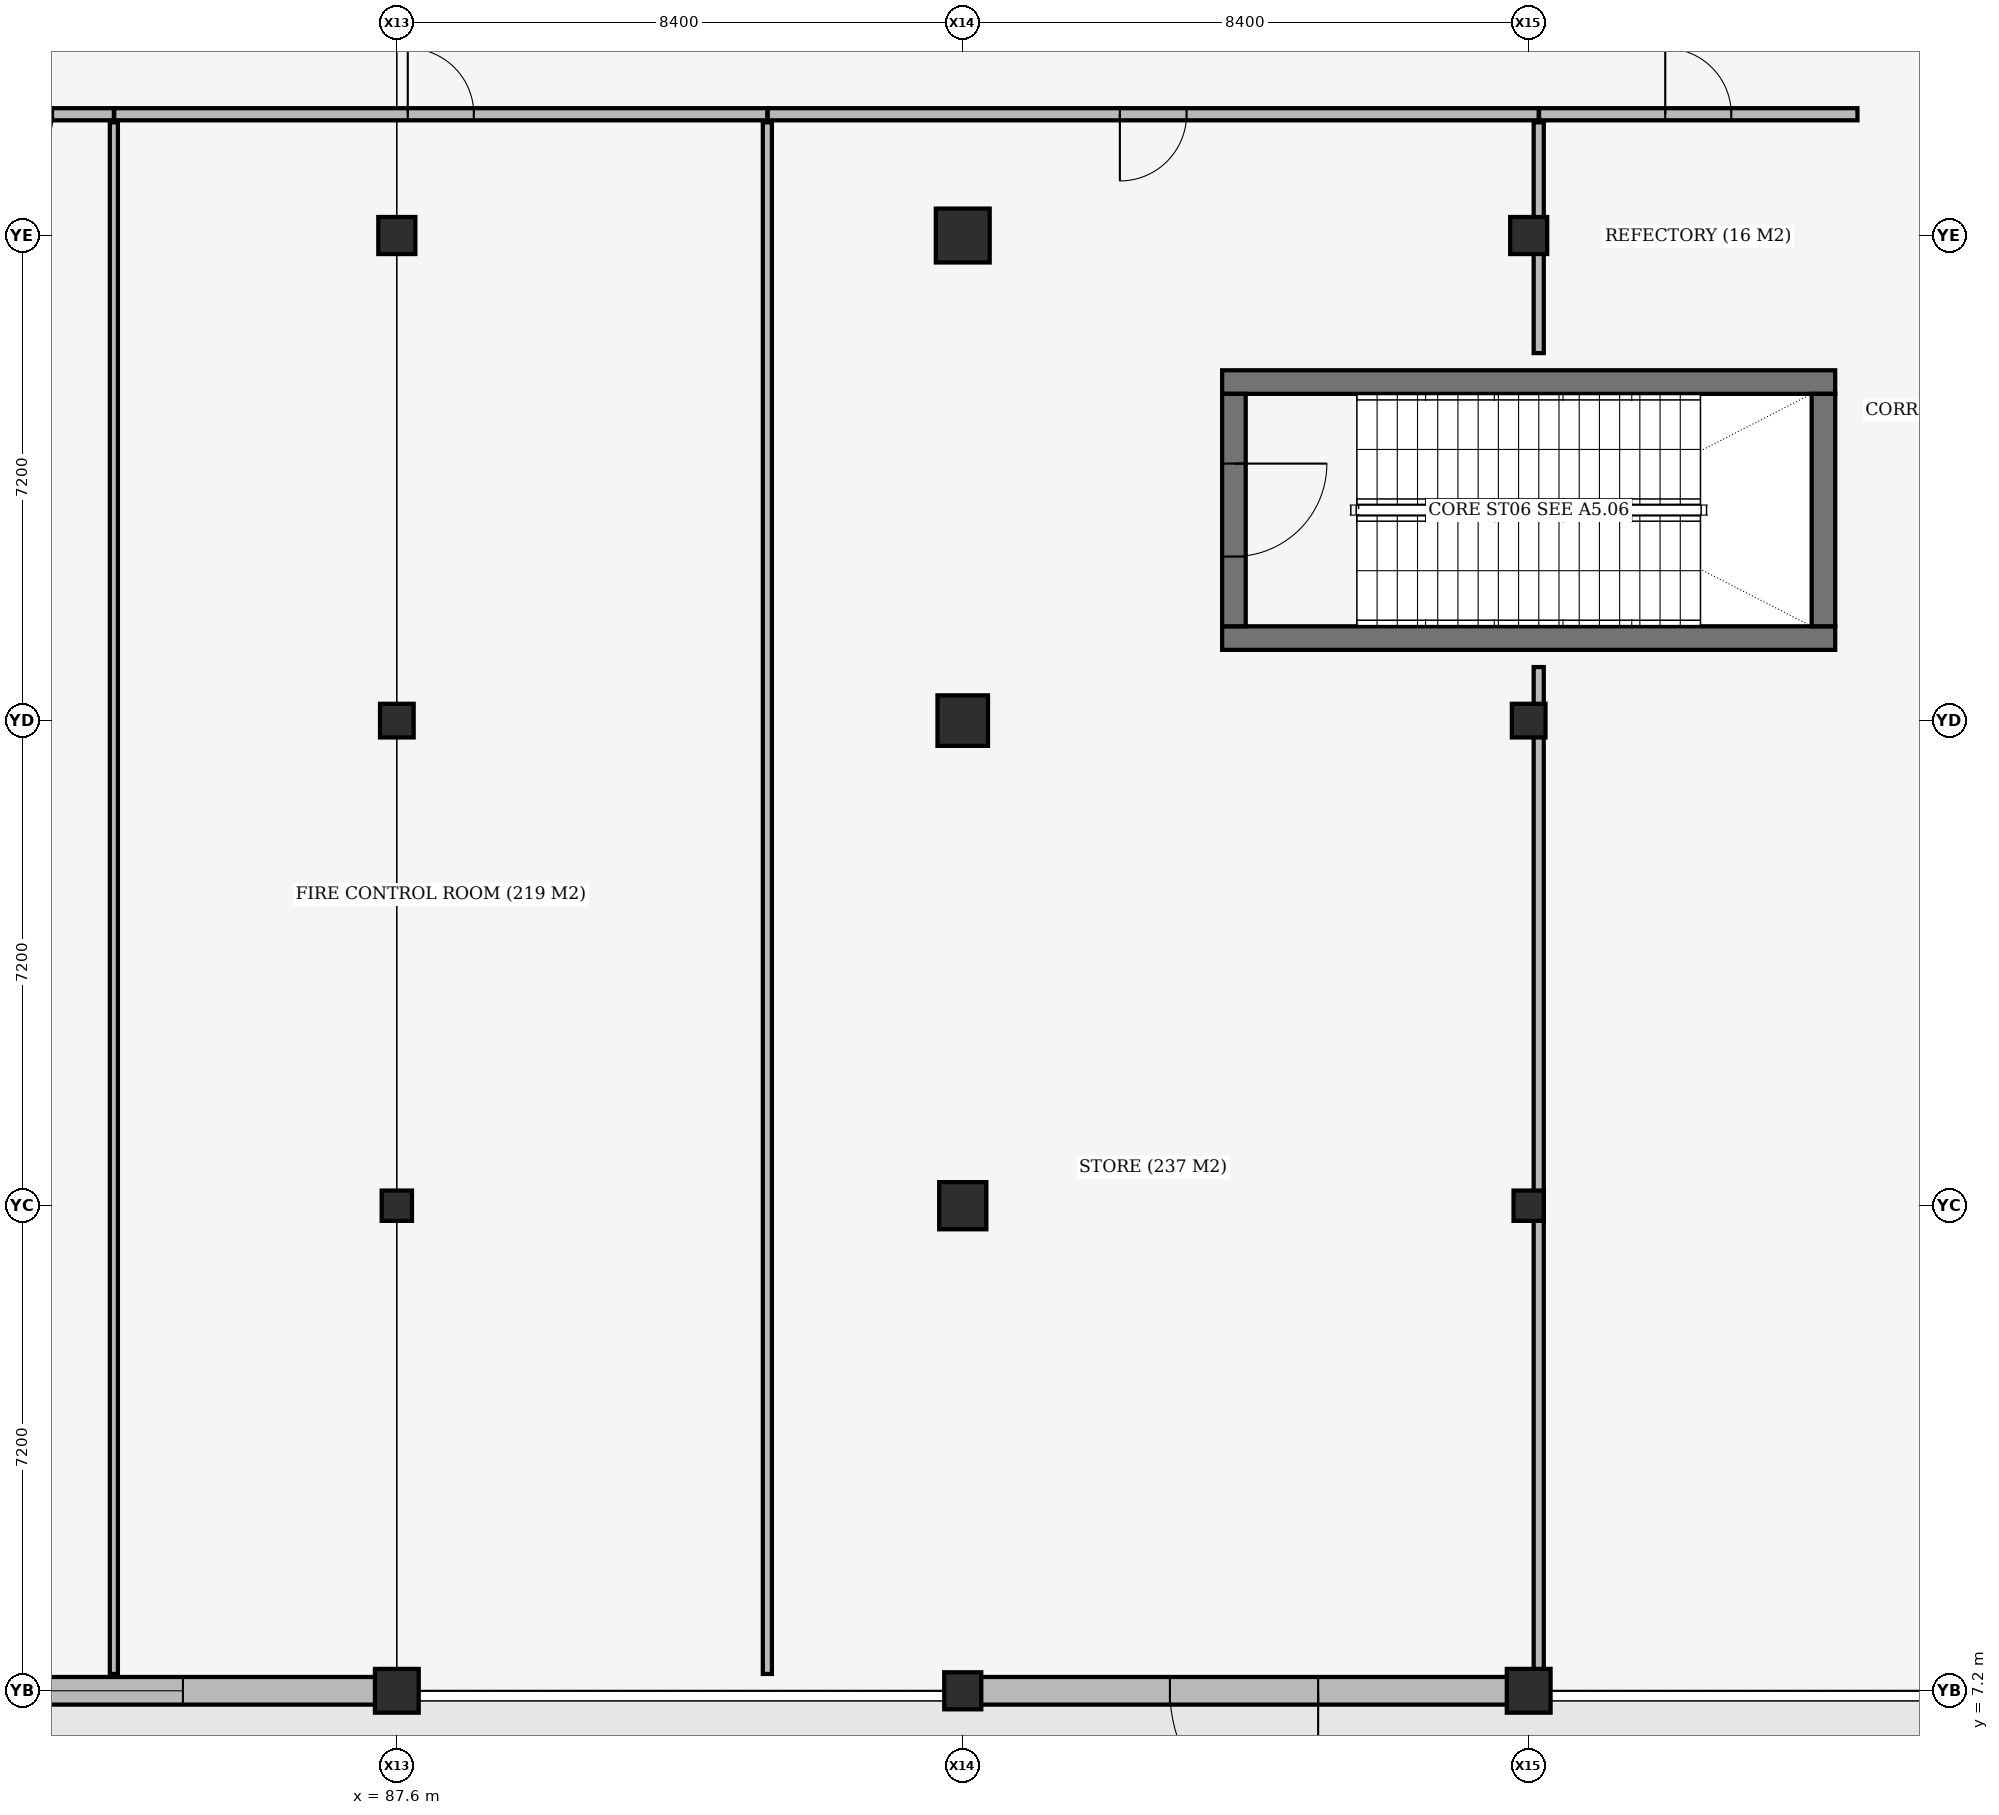
"""IFC4 building model, lengths in metres.
Left out: names, types, materials, properties, quantities, classifications, styles, units other than length and angle.
Written with IfcOpenShell. Run it as: python <this file> out.ifc"""

import sys

from ifc_helpers import new_model, si_unit, direction, frame, frame_2d, origin, origin_2d, place, context, subcontext, project, spatial, rectangle, circle, extrude, element, fill, save


model = new_model("IFC4")
c1 = context("Model", 3, precision=1e-05, world=origin(), true_north=direction((0.0, 1.0)))
c2 = subcontext(c1, "Body", "Model", "MODEL_VIEW")
j1 = project(units=[si_unit("LENGTHUNIT", "METRE"), si_unit("PLANEANGLEUNIT", "RADIAN")], contexts=[c1])
p1 = place(None, origin())
s1 = spatial("IfcSite", under=j1, at=p1, CompositionType="ELEMENT")
p2 = place(p1, origin())
s2 = spatial("IfcBuilding", under=s1, at=p2, CompositionType="ELEMENT")
p3 = place(p2, origin())
s3 = spatial("IfcBuildingStorey", under=s2, at=p3, CompositionType="ELEMENT", Elevation=0.0)
p4 = place(p3, frame((87.6, 7.2, 0.0), z_axis=(0.0, 0.0, 1.0), x_axis=(1.0, 0.0, 0.0)))
e1 = element("IfcColumn", 1, at=p4, inside=s3, PredefinedType="COLUMN", context=c2, shape_type="SweptSolid", body=[
    extrude(circle(Radius=0.325, at=origin_2d()), origin(), (0.0, 0.0, 1.0), 5.1),
])
p5 = place(p3, frame((87.6, 14.4, 0.0), z_axis=(0.0, 0.0, 1.0), x_axis=(1.0, 0.0, 0.0)))
e2 = element("IfcColumn", 2, at=p5, inside=s3, PredefinedType="COLUMN", context=c2, shape_type="SweptSolid", body=[
    extrude(rectangle(XDim=0.45, YDim=0.45, at=origin_2d()), origin(), (0.0, 0.0, 1.0), 5.1),
])
p6 = place(p3, frame((87.6, 21.6, 0.0), z_axis=(0.0, 0.0, 1.0), x_axis=(1.0, 0.0, 0.0)))
e3 = element("IfcColumn", 3, at=p6, inside=s3, PredefinedType="COLUMN", context=c2, shape_type="SweptSolid", body=[
    extrude(rectangle(XDim=0.5, YDim=0.5, at=origin_2d()), origin(), (0.0, 0.0, 1.0), 5.1),
])
p7 = place(p3, frame((87.6, 28.8, 0.0), z_axis=(0.0, 0.0, 1.0), x_axis=(1.0, 0.0, 0.0)))
e4 = element("IfcColumn", 4, at=p7, inside=s3, PredefinedType="COLUMN", context=c2, shape_type="SweptSolid", body=[
    extrude(rectangle(XDim=0.55, YDim=0.55, at=origin_2d()), origin(), (0.0, 0.0, 1.0), 5.1),
])
p8 = place(p3, frame((96.0, 7.2, 0.0), z_axis=(0.0, 0.0, 1.0), x_axis=(1.0, 0.0, 0.0)))
e5 = element("IfcColumn", 5, at=p8, inside=s3, PredefinedType="COLUMN", context=c2, shape_type="SweptSolid", body=[
    extrude(circle(Radius=0.275, at=origin_2d()), origin(), (0.0, 0.0, 1.0), 5.1),
])
p9 = place(p3, frame((96.0, 14.4, 0.0), z_axis=(0.0, 0.0, 1.0), x_axis=(1.0, 0.0, 0.0)))
e6 = element("IfcColumn", 6, at=p9, inside=s3, PredefinedType="COLUMN", context=c2, shape_type="SweptSolid", body=[
    extrude(rectangle(XDim=0.7, YDim=0.7, at=origin_2d()), origin(), (0.0, 0.0, 1.0), 5.1),
])
p10 = place(p3, frame((96.0, 21.6, 0.0), z_axis=(0.0, 0.0, 1.0), x_axis=(1.0, 0.0, 0.0)))
e7 = element("IfcColumn", 7, at=p10, inside=s3, PredefinedType="COLUMN", context=c2, shape_type="SweptSolid", body=[
    extrude(rectangle(XDim=0.75, YDim=0.75, at=origin_2d()), origin(), (0.0, 0.0, 1.0), 5.1),
])
p11 = place(p3, frame((96.0, 28.8, 0.0), z_axis=(0.0, 0.0, 1.0), x_axis=(1.0, 0.0, 0.0)))
e8 = element("IfcColumn", 8, at=p11, inside=s3, PredefinedType="COLUMN", context=c2, shape_type="SweptSolid", body=[
    extrude(rectangle(XDim=0.8, YDim=0.8, at=origin_2d()), origin(), (0.0, 0.0, 1.0), 5.1),
])
p12 = place(p3, frame((104.4, 7.2, 0.0), z_axis=(0.0, 0.0, 1.0), x_axis=(1.0, 0.0, 0.0)))
e9 = element("IfcColumn", 9, at=p12, inside=s3, PredefinedType="COLUMN", context=c2, shape_type="SweptSolid", body=[
    extrude(circle(Radius=0.325, at=origin_2d()), origin(), (0.0, 0.0, 1.0), 5.1),
])
p13 = place(p3, frame((104.4, 14.4, 0.0), z_axis=(0.0, 0.0, 1.0), x_axis=(1.0, 0.0, 0.0)))
e10 = element("IfcColumn", 10, at=p13, inside=s3, PredefinedType="COLUMN", context=c2, shape_type="SweptSolid", body=[
    extrude(rectangle(XDim=0.45, YDim=0.45, at=origin_2d()), origin(), (0.0, 0.0, 1.0), 5.1),
])
p14 = place(p3, frame((104.4, 21.6, 0.0), z_axis=(0.0, 0.0, 1.0), x_axis=(1.0, 0.0, 0.0)))
e11 = element("IfcColumn", 11, at=p14, inside=s3, PredefinedType="COLUMN", context=c2, shape_type="SweptSolid", body=[
    extrude(rectangle(XDim=0.5, YDim=0.5, at=origin_2d()), origin(), (0.0, 0.0, 1.0), 5.1),
])
p15 = place(p3, frame((104.4, 28.8, 0.0), z_axis=(0.0, 0.0, 1.0), x_axis=(1.0, 0.0, 0.0)))
e12 = element("IfcColumn", 12, at=p15, inside=s3, PredefinedType="COLUMN", context=c2, shape_type="SweptSolid", body=[
    extrude(rectangle(XDim=0.55, YDim=0.55, at=origin_2d()), origin(), (0.0, 0.0, 1.0), 5.1),
])
for number, where, z_axis, x_axis in (
    (13, (99.85, 22.825, 0.0), (0.0, 0.0, 1.0), (1.0, 0.0, 0.0)),
    (14, (108.95, 26.625, 0.0), (0.0, 0.0, 1.0), (-1.0, 0.0, 0.0)),
):
    element("IfcWall", number, at=place(p3, frame(where, z_axis=z_axis, x_axis=x_axis)), inside=s3, PredefinedType="SHEAR", context=c2, shape_type="SweptSolid", body=[
        extrude(rectangle(XDim=9.1, YDim=0.35, at=frame_2d((4.55, 0.0))), origin(), (0.0, 0.0, 1.0), 5.1),
    ])
p16 = place(p3, frame((108.775, 23.0, 0.0), z_axis=(0.0, 0.0, 1.0), x_axis=(0.0, 1.0, 0.0)))
e15 = element("IfcWall", 15, at=p16, inside=s3, PredefinedType="SHEAR", context=c2, shape_type="SweptSolid", body=[
    extrude(rectangle(XDim=3.45, YDim=0.35, at=frame_2d((1.725, 0.0))), origin(), (0.0, 0.0, 1.0), 5.1),
])
p17 = place(p3, frame((87.283, 7.2, 0.0), z_axis=(0.0, 0.0, 1.0), x_axis=(-1.0, 0.0, 0.0)))
e16 = element("IfcWall", 16, at=p17, inside=s3, PredefinedType="STANDARD", context=c2, shape_type="SweptSolid", body=[
    extrude(rectangle(XDim=7.816, YDim=0.41, at=frame_2d((3.908, 0.0))), origin(), (0.0, 0.0, 1.0), 4.3),
])
p18 = place(p17, frame((2.858, 0.0, 0.8)))
e17 = element("IfcOpeningElement", 17, at=p18, cuts=e16, PredefinedType="OPENING", context=c2, shape_type="SweptSolid", body=[
    extrude(rectangle(XDim=2.1, YDim=3.0, at=frame_2d((1.05, 1.5))), frame((0.0, 0.215, 0.0), z_axis=(0.0, -1.0, 0.0), x_axis=(1.0, 0.0, 0.0)), (0.0, 0.0, 1.0), 0.43),
])
p19 = place(p3, frame((104.083, 7.2, 0.0), z_axis=(0.0, 0.0, 1.0), x_axis=(-1.0, 0.0, 0.0)))
e18 = element("IfcWall", 18, at=p19, inside=s3, PredefinedType="STANDARD", context=c2, shape_type="SweptSolid", body=[
    extrude(rectangle(XDim=7.816, YDim=0.41, at=frame_2d((3.908, 0.0))), origin(), (0.0, 0.0, 1.0), 4.45),
])
p20 = place(p19, frame((2.808, 0.0, 0.0)))
e19 = element("IfcOpeningElement", 19, at=p20, cuts=e18, PredefinedType="OPENING", context=c2, shape_type="SweptSolid", body=[
    extrude(rectangle(XDim=2.2, YDim=2.5, at=frame_2d((1.1, 1.25))), frame((0.0, 0.215, 0.0), z_axis=(0.0, -1.0, 0.0), x_axis=(1.0, 0.0, 0.0)), (0.0, 0.0, 1.0), 0.43),
])
p21 = place(p3, frame((100.025, 26.45, 0.0), z_axis=(0.0, 0.0, 1.0), x_axis=(0.0, -1.0, 0.0)))
e20 = element("IfcWall", 20, at=p21, inside=s3, PredefinedType="SHEAR", context=c2, shape_type="SweptSolid", body=[
    extrude(rectangle(XDim=3.45, YDim=0.35, at=frame_2d((1.725, 0.0))), origin(), (0.0, 0.0, 1.0), 5.1),
])
p22 = place(p21, frame((1.035, 0.0, 0.0)))
e21 = element("IfcOpeningElement", 21, at=p22, cuts=e20, PredefinedType="OPENING", context=c2, shape_type="SweptSolid", body=[
    extrude(rectangle(XDim=1.38, YDim=2.2, at=frame_2d((0.69, 1.1))), frame((0.0, 0.185, 0.0), z_axis=(0.0, -1.0, 0.0), x_axis=(1.0, 0.0, 0.0)), (0.0, 0.0, 1.0), 0.37),
])
p23 = place(p3, frame((80.605, 30.6, 0.0), z_axis=(0.0, 0.0, 1.0), x_axis=(1.0, 0.0, 0.0)))
e22 = element("IfcWall", 22, at=p23, inside=s3, PredefinedType="PARTITIONING", context=c2, shape_type="SweptSolid", body=[
    extrude(rectangle(XDim=2.795, YDim=0.18, at=frame_2d((1.397, 0.0))), origin(), (0.0, 0.0, 1.0), 4.65),
])
p24 = place(p23, frame((0.903, 0.0, 0.0)))
e23 = element("IfcOpeningElement", 23, at=p24, cuts=e22, PredefinedType="OPENING", context=c2, shape_type="SweptSolid", body=[
    extrude(rectangle(XDim=0.99, YDim=2.18, at=frame_2d((0.495, 1.09))), frame((0.0, 0.1, 0.0), z_axis=(0.0, -1.0, 0.0), x_axis=(1.0, 0.0, 0.0)), (0.0, 0.0, 1.0), 0.2),
])
p25 = place(p3, frame((83.4, 7.45, 0.0), z_axis=(0.0, 0.0, 1.0), x_axis=(0.0, 1.0, 0.0)))
e24 = element("IfcWall", 24, at=p25, inside=s3, PredefinedType="PARTITIONING", context=c2, shape_type="SweptSolid", body=[
    extrude(rectangle(XDim=23.03, YDim=0.12, at=frame_2d((11.515, 0.0))), origin(), (0.0, 0.0, 1.0), 4.3),
])
p26 = place(p3, frame((83.405, 30.6, 0.0), z_axis=(0.0, 0.0, 1.0), x_axis=(1.0, 0.0, 0.0)))
e25 = element("IfcWall", 25, at=p26, inside=s3, PredefinedType="PARTITIONING", context=c2, shape_type="SweptSolid", body=[
    extrude(rectangle(XDim=9.695, YDim=0.18, at=frame_2d((4.848, 0.0))), origin(), (0.0, 0.0, 1.0), 4.35),
])
p27 = place(p26, frame((4.357, 0.0, 0.0)))
e26 = element("IfcOpeningElement", 26, at=p27, cuts=e25, PredefinedType="OPENING", context=c2, shape_type="SweptSolid", body=[
    extrude(rectangle(XDim=0.98, YDim=2.18, at=frame_2d((0.49, 1.09))), frame((0.0, 0.1, 0.0), z_axis=(0.0, -1.0, 0.0), x_axis=(1.0, 0.0, 0.0)), (0.0, 0.0, 1.0), 0.2),
])
p28 = place(p3, frame((93.1, 7.45, 0.0), z_axis=(0.0, 0.0, 1.0), x_axis=(0.0, 1.0, 0.0)))
e27 = element("IfcWall", 27, at=p28, inside=s3, PredefinedType="PARTITIONING", context=c2, shape_type="SweptSolid", body=[
    extrude(rectangle(XDim=23.03, YDim=0.135, at=frame_2d((11.515, 0.0))), origin(), (0.0, 0.0, 1.0), 4.35),
])
p29 = place(p3, frame((93.105, 30.6, 0.0), z_axis=(0.0, 0.0, 1.0), x_axis=(1.0, 0.0, 0.0)))
e28 = element("IfcWall", 28, at=p29, inside=s3, PredefinedType="PARTITIONING", context=c2, shape_type="SweptSolid", body=[
    extrude(rectangle(XDim=11.444, YDim=0.18, at=frame_2d((5.722, 0.0))), origin(), (0.0, 0.0, 1.0), 4.4),
])
p30 = place(p29, frame((5.227, 0.0, 0.0)))
e29 = element("IfcOpeningElement", 29, at=p30, cuts=e28, PredefinedType="OPENING", context=c2, shape_type="SweptSolid", body=[
    extrude(rectangle(XDim=0.99, YDim=2.18, at=frame_2d((0.495, 1.09))), frame((0.0, 0.1, 0.0), z_axis=(0.0, -1.0, 0.0), x_axis=(1.0, 0.0, 0.0)), (0.0, 0.0, 1.0), 0.2),
])
p31 = place(p3, frame((104.549, 7.45, 0.0), z_axis=(0.0, 0.0, 1.0), x_axis=(0.0, 1.0, 0.0)))
e30 = element("IfcWall", 30, at=p31, inside=s3, PredefinedType="PARTITIONING", context=c2, shape_type="SweptSolid", body=[
    extrude(rectangle(XDim=14.945, YDim=0.15, at=frame_2d((7.473, 0.0))), origin(), (0.0, 0.0, 1.0), 4.3),
])
p32 = place(p3, frame((104.554, 30.6, 0.0), z_axis=(0.0, 0.0, 1.0), x_axis=(1.0, 0.0, 0.0)))
e31 = element("IfcWall", 31, at=p32, inside=s3, PredefinedType="PARTITIONING", context=c2, shape_type="SweptSolid", body=[
    extrude(rectangle(XDim=4.726, YDim=0.18, at=frame_2d((2.363, 0.0))), origin(), (0.0, 0.0, 1.0), 4.5),
])
p33 = place(p32, frame((1.873, 0.0, 0.0)))
e32 = element("IfcOpeningElement", 32, at=p33, cuts=e31, PredefinedType="OPENING", context=c2, shape_type="SweptSolid", body=[
    extrude(rectangle(XDim=0.98, YDim=2.18, at=frame_2d((0.49, 1.09))), frame((0.0, 0.1, 0.0), z_axis=(0.0, -1.0, 0.0), x_axis=(1.0, 0.0, 0.0)), (0.0, 0.0, 1.0), 0.2),
])
p34 = place(p3, frame((104.549, 27.055, 0.0), z_axis=(0.0, 0.0, 1.0), x_axis=(0.0, 1.0, 0.0)))
e33 = element("IfcWall", 33, at=p34, inside=s3, PredefinedType="PARTITIONING", context=c2, shape_type="SweptSolid", body=[
    extrude(rectangle(XDim=3.425, YDim=0.15, at=frame_2d((1.712, 0.0))), origin(), (0.0, 0.0, 1.0), 4.4),
])
p35 = place(p18, origin())
e34 = element("IfcWindow", 34, at=p35, inside=s3, PartitioningType="DOUBLE_PANEL_VERTICAL", PredefinedType="WINDOW", context=c2, shape_type="SweptSolid", body=[
    extrude(rectangle(XDim=2.1, YDim=3.0, at=frame_2d((1.05, 1.5))), frame((0.0, 0.03, 0.0), z_axis=(0.0, -1.0, 0.0), x_axis=(1.0, 0.0, 0.0)), (0.0, 0.0, 1.0), 0.06),
])
fill(e17, e34)
p36 = place(p20, origin())
e35 = element("IfcDoor", 35, at=p36, inside=s3, OperationType="DOUBLE_DOOR_SINGLE_SWING", PredefinedType="DOOR", context=c2, shape_type="SweptSolid", body=[
    extrude(rectangle(XDim=2.2, YDim=2.5, at=frame_2d((1.1, 1.25))), frame((0.0, 0.025, 0.0), z_axis=(0.0, -1.0, 0.0), x_axis=(1.0, 0.0, 0.0)), (0.0, 0.0, 1.0), 0.05),
])
fill(e19, e35)
p37 = place(p22, origin())
e36 = element("IfcDoor", 36, at=p37, inside=s3, OperationType="DOUBLE_DOOR_SINGLE_SWING", PredefinedType="DOOR", context=c2, shape_type="SweptSolid", body=[
    extrude(rectangle(XDim=1.38, YDim=2.2, at=frame_2d((0.69, 1.1))), frame((0.0, 0.025, 0.0), z_axis=(0.0, -1.0, 0.0), x_axis=(1.0, 0.0, 0.0)), (0.0, 0.0, 1.0), 0.05),
])
fill(e21, e36)
p38 = place(p24, origin())
e37 = element("IfcDoor", 37, at=p38, inside=s3, OperationType="SINGLE_SWING_RIGHT", PredefinedType="DOOR", context=c2, shape_type="SweptSolid", body=[
    extrude(rectangle(XDim=0.99, YDim=2.18, at=frame_2d((0.495, 1.09))), frame((0.0, 0.025, 0.0), z_axis=(0.0, -1.0, 0.0), x_axis=(1.0, 0.0, 0.0)), (0.0, 0.0, 1.0), 0.05),
])
fill(e23, e37)
p39 = place(p27, origin())
e38 = element("IfcDoor", 38, at=p39, inside=s3, OperationType="SINGLE_SWING_LEFT", PredefinedType="DOOR", context=c2, shape_type="SweptSolid", body=[
    extrude(rectangle(XDim=0.98, YDim=2.18, at=frame_2d((0.49, 1.09))), frame((0.0, 0.025, 0.0), z_axis=(0.0, -1.0, 0.0), x_axis=(1.0, 0.0, 0.0)), (0.0, 0.0, 1.0), 0.05),
])
fill(e26, e38)
p40 = place(p30, origin())
e39 = element("IfcDoor", 39, at=p40, inside=s3, OperationType="SINGLE_SWING_RIGHT", PredefinedType="DOOR", context=c2, shape_type="SweptSolid", body=[
    extrude(rectangle(XDim=0.99, YDim=2.18, at=frame_2d((0.495, 1.09))), frame((0.0, 0.025, 0.0), z_axis=(0.0, -1.0, 0.0), x_axis=(1.0, 0.0, 0.0)), (0.0, 0.0, 1.0), 0.05),
])
fill(e29, e39)
p41 = place(p33, origin())
e40 = element("IfcDoor", 40, at=p41, inside=s3, OperationType="SINGLE_SWING_LEFT", PredefinedType="DOOR", context=c2, shape_type="SweptSolid", body=[
    extrude(rectangle(XDim=0.98, YDim=2.18, at=frame_2d((0.49, 1.09))), frame((0.0, 0.025, 0.0), z_axis=(0.0, -1.0, 0.0), x_axis=(1.0, 0.0, 0.0)), (0.0, 0.0, 1.0), 0.05),
])
fill(e32, e40)
save(model, sys.argv[1])
